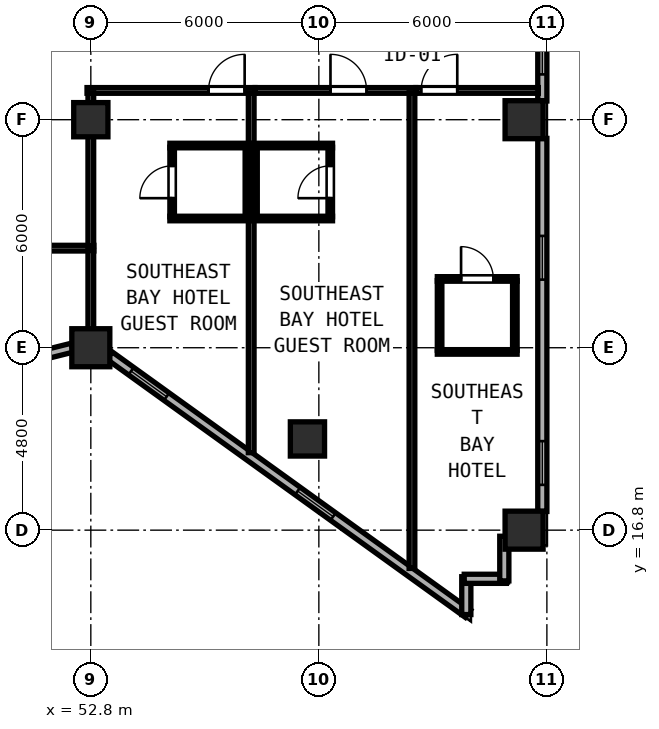
"""IFC4 building model, lengths in metres.
Left out: names, types, materials, properties, quantities, classifications, styles, units other than length and angle.
Written with IfcOpenShell. Run it as: python <this file> out.ifc"""

import sys

from ifc_helpers import new_model, si_unit, direction, frame, frame_2d, origin, origin_2d, place, context, subcontext, project, spatial, rectangle, hollow_rectangle, extrude, element, fill, save


model = new_model("IFC4")
c1 = context("Model", 3, precision=1e-05, world=origin(), true_north=direction((0.0, 1.0)))
c2 = subcontext(c1, "Body", "Model", "MODEL_VIEW")
j1 = project(units=[si_unit("LENGTHUNIT", "METRE"), si_unit("PLANEANGLEUNIT", "RADIAN")], contexts=[c1])
p1 = place(None, origin())
s1 = spatial("IfcSite", under=j1, at=p1, CompositionType="ELEMENT")
p2 = place(p1, origin())
s2 = spatial("IfcBuilding", under=s1, at=p2, CompositionType="ELEMENT")
p3 = place(p2, frame((0.0, 0.0, 128.8)))
s3 = spatial("IfcBuildingStorey", under=s2, at=p3, CompositionType="ELEMENT", Elevation=128.8)
for number, where, z_axis, x_axis in (
    (1, (52.8, 21.6, 0.0), (0.0, 0.0, 1.0), (1.0, 0.0, 0.0)),
    (2, (64.2, 16.8, 0.0), (0.0, 0.0, 1.0), (1.0, 0.0, 0.0)),
    (3, (64.2, 27.6, 0.0), (0.0, 0.0, 1.0), (1.0, 0.0, 0.0)),
):
    element("IfcColumn", number, at=place(p3, frame(where, z_axis=z_axis, x_axis=x_axis)), inside=s3, PredefinedType="COLUMN", context=c2, shape_type="SweptSolid", body=[
        extrude(hollow_rectangle(XDim=1.0, YDim=1.0, WallThickness=0.038, at=origin_2d()), origin(), (0.0, 0.0, 1.0), 3.8),
    ])
for number, where, z_axis, x_axis in (
    (4, (52.8, 27.6, 0.0), (0.0, 0.0, 1.0), (1.0, 0.0, 0.0)),
    (5, (58.5, 19.2, 0.0), (0.0, 0.0, 1.0), (1.0, 0.0, 0.0)),
):
    element("IfcColumn", number, at=place(p3, frame(where, z_axis=z_axis, x_axis=x_axis)), inside=s3, PredefinedType="COLUMN", context=c2, shape_type="SweptSolid", body=[
        extrude(hollow_rectangle(XDim=0.9, YDim=0.9, WallThickness=0.034, at=origin_2d()), origin(), (0.0, 0.0, 1.0), 3.8),
    ])
p4 = place(p3, frame((47.932, 20.507, 0.0), z_axis=(0.0, 0.0, 1.0), x_axis=(0.970145683738, 0.242522890311, 0.0)))
e6 = element("IfcWall", 6, at=p4, inside=s3, PredefinedType="SOLIDWALL", context=c2, shape_type="SweptSolid", body=[
    extrude(rectangle(XDim=4.511, YDim=0.24, at=frame_2d((2.255, 0.0))), origin(), (0.0, 0.0, 1.0), 3.145),
])
p5 = place(p4, frame((0.7, 0.0, 0.85)))
e7 = element("IfcOpeningElement", 7, at=p5, cuts=e6, PredefinedType="OPENING", context=c2, shape_type="SweptSolid", body=[
    extrude(rectangle(XDim=1.15, YDim=1.8, at=frame_2d((0.575, 0.9))), frame((0.0, 0.13, 0.0), z_axis=(0.0, -1.0, 0.0), x_axis=(1.0, 0.0, 0.0)), (0.0, 0.0, 1.0), 0.26),
])
p6 = place(p3, frame((53.292, 21.394, 0.0), z_axis=(0.0, 0.0, 1.0), x_axis=(0.811543504691, -0.584291998913, 0.0)))
e8 = element("IfcWall", 8, at=p6, inside=s3, PredefinedType="SOLIDWALL", context=c2, shape_type="SweptSolid", body=[
    extrude(rectangle(XDim=11.623, YDim=0.24, at=frame_2d((5.812, 0.0))), origin(), (0.0, 0.0, 1.0), 3.145),
])
p7 = place(p6, frame((0.7, 0.0, 0.85)))
e9 = element("IfcOpeningElement", 9, at=p7, cuts=e8, PredefinedType="OPENING", context=c2, shape_type="SweptSolid", body=[
    extrude(rectangle(XDim=1.15, YDim=1.8, at=frame_2d((0.575, 0.9))), frame((0.0, 0.13, 0.0), z_axis=(0.0, -1.0, 0.0), x_axis=(1.0, 0.0, 0.0)), (0.0, 0.0, 1.0), 0.26),
])
p8 = place(p6, frame((6.1, 0.0, 0.85)))
e10 = element("IfcOpeningElement", 10, at=p8, cuts=e8, PredefinedType="OPENING", context=c2, shape_type="SweptSolid", body=[
    extrude(rectangle(XDim=1.15, YDim=1.8, at=frame_2d((0.575, 0.9))), frame((0.0, 0.13, 0.0), z_axis=(0.0, -1.0, 0.0), x_axis=(1.0, 0.0, 0.0)), (0.0, 0.0, 1.0), 0.26),
])
p9 = place(p3, frame((62.68, 14.579, 0.0), z_axis=(0.0, 0.0, 1.0), x_axis=(0.0, 1.0, 0.0)))
e11 = element("IfcWall", 11, at=p9, inside=s3, PredefinedType="SOLIDWALL", context=c2, shape_type="SweptSolid", body=[
    extrude(rectangle(XDim=0.996, YDim=0.24, at=frame_2d((0.498, 0.0))), origin(), (0.0, 0.0, 1.0), 3.6),
])
p10 = place(p3, frame((62.625, 15.52, 0.0), z_axis=(0.0, 0.0, 1.0), x_axis=(1.0, 0.0, 0.0)))
e12 = element("IfcWall", 12, at=p10, inside=s3, PredefinedType="SOLIDWALL", context=c2, shape_type="SweptSolid", body=[
    extrude(rectangle(XDim=1.11, YDim=0.24, at=frame_2d((0.555, 0.0))), origin(), (0.0, 0.0, 1.0), 3.6),
])
p11 = place(p3, frame((63.68, 15.465, 0.0), z_axis=(0.0, 0.0, 1.0), x_axis=(0.0, 1.0, 0.0)))
e13 = element("IfcWall", 13, at=p11, inside=s3, PredefinedType="SOLIDWALL", context=c2, shape_type="SweptSolid", body=[
    extrude(rectangle(XDim=1.175, YDim=0.24, at=frame_2d((0.587, 0.0))), origin(), (0.0, 0.0, 1.0), 3.6),
])
p12 = place(p3, frame((64.68, 17.292, 0.0), z_axis=(0.0, 0.0, 1.0), x_axis=(0.0, 1.0, 0.0)))
e14 = element("IfcWall", 14, at=p12, inside=s3, PredefinedType="SOLIDWALL", context=c2, shape_type="SweptSolid", body=[
    extrude(rectangle(XDim=9.816, YDim=0.24, at=frame_2d((4.908, 0.0))), origin(), (0.0, 0.0, 1.0), 3.6),
])
p13 = place(p12, frame((0.7, 0.0, 0.85)))
e15 = element("IfcOpeningElement", 15, at=p13, cuts=e14, PredefinedType="OPENING", context=c2, shape_type="SweptSolid", body=[
    extrude(rectangle(XDim=1.15, YDim=1.8, at=frame_2d((0.575, 0.9))), frame((0.0, 0.13, 0.0), z_axis=(0.0, -1.0, 0.0), x_axis=(1.0, 0.0, 0.0)), (0.0, 0.0, 1.0), 0.26),
])
p14 = place(p12, frame((6.1, 0.0, 0.85)))
e16 = element("IfcOpeningElement", 16, at=p14, cuts=e14, PredefinedType="OPENING", context=c2, shape_type="SweptSolid", body=[
    extrude(rectangle(XDim=1.15, YDim=1.8, at=frame_2d((0.575, 0.9))), frame((0.0, 0.13, 0.0), z_axis=(0.0, -1.0, 0.0), x_axis=(1.0, 0.0, 0.0)), (0.0, 0.0, 1.0), 0.26),
])
p15 = place(p3, frame((64.68, 28.092, 0.0), z_axis=(0.0, 0.0, 1.0), x_axis=(0.0, 1.0, 0.0)))
e17 = element("IfcWall", 17, at=p15, inside=s3, PredefinedType="SOLIDWALL", context=c2, shape_type="SweptSolid", body=[
    extrude(rectangle(XDim=9.443, YDim=0.24, at=frame_2d((4.721, 0.0))), origin(), (0.0, 0.0, 1.0), 3.6),
])
p16 = place(p15, frame((0.7, 0.0, 0.85)))
e18 = element("IfcOpeningElement", 18, at=p16, cuts=e17, PredefinedType="OPENING", context=c2, shape_type="SweptSolid", body=[
    extrude(rectangle(XDim=1.15, YDim=1.8, at=frame_2d((0.575, 0.9))), frame((0.0, 0.13, 0.0), z_axis=(0.0, -1.0, 0.0), x_axis=(1.0, 0.0, 0.0)), (0.0, 0.0, 1.0), 0.26),
])
p17 = place(p15, frame((6.1, 0.0, 0.85)))
e19 = element("IfcOpeningElement", 19, at=p17, cuts=e17, PredefinedType="OPENING", context=c2, shape_type="SweptSolid", body=[
    extrude(rectangle(XDim=1.15, YDim=1.8, at=frame_2d((0.575, 0.9))), frame((0.0, 0.13, 0.0), z_axis=(0.0, -1.0, 0.0), x_axis=(1.0, 0.0, 0.0)), (0.0, 0.0, 1.0), 0.26),
])
p18 = place(p3, frame((45.682, 24.22, 0.0), z_axis=(0.0, 0.0, 1.0), x_axis=(1.0, 0.0, 0.0)))
e20 = element("IfcWall", 20, at=p18, inside=s3, PredefinedType="PARTITIONING", context=c2, shape_type="SweptSolid", body=[
    extrude(rectangle(XDim=7.198, YDim=0.15, at=frame_2d((3.599, 0.0))), origin(), (0.0, 0.0, 1.0), 3.6),
])
p19 = place(p18, frame((2.143, 0.0, 0.0), z_axis=(0.0, 0.0, 1.0), x_axis=(-1.0, 0.0, 0.0)))
e21 = element("IfcOpeningElement", 21, at=p19, cuts=e20, PredefinedType="OPENING", context=c2, shape_type="SweptSolid", body=[
    extrude(rectangle(XDim=0.95, YDim=2.12, at=frame_2d((0.475, 1.06))), frame((0.0, 0.085, 0.0), z_axis=(0.0, -1.0, 0.0), x_axis=(1.0, 0.0, 0.0)), (0.0, 0.0, 1.0), 0.17),
])
p20 = place(p3, frame((52.8, 21.819, 0.0), z_axis=(0.0, 0.0, 1.0), x_axis=(0.0, 1.0, 0.0)))
e22 = element("IfcWall", 22, at=p20, inside=s3, PredefinedType="PARTITIONING", context=c2, shape_type="SweptSolid", body=[
    extrude(rectangle(XDim=2.341, YDim=0.15, at=frame_2d((1.171, 0.0))), origin(), (0.0, 0.0, 1.0), 3.145),
])
p21 = place(p3, frame((52.7, 28.37, 0.0), z_axis=(0.0, 0.0, 1.0), x_axis=(1.0, 0.0, 0.0)))
e23 = element("IfcWall", 23, at=p21, inside=s3, PredefinedType="PARTITIONING", context=c2, shape_type="SweptSolid", body=[
    extrude(rectangle(XDim=4.42, YDim=0.15, at=frame_2d((2.21, 0.0))), origin(), (0.0, 0.0, 1.0), 3.6),
])
p22 = place(p21, frame((4.147, 0.0, 0.0), z_axis=(0.0, 0.0, 1.0), x_axis=(-1.0, 0.0, 0.0)))
e24 = element("IfcOpeningElement", 24, at=p22, cuts=e23, PredefinedType="OPENING", context=c2, shape_type="SweptSolid", body=[
    extrude(rectangle(XDim=0.95, YDim=2.15, at=frame_2d((0.475, 1.075))), frame((0.0, 0.085, 0.0), z_axis=(0.0, -1.0, 0.0), x_axis=(1.0, 0.0, 0.0)), (0.0, 0.0, 1.0), 0.17),
])
p23 = place(p3, frame((52.8, 24.28, 0.0), z_axis=(0.0, 0.0, 1.0), x_axis=(0.0, 1.0, 0.0)))
e25 = element("IfcWall", 25, at=p23, inside=s3, PredefinedType="PARTITIONING", context=c2, shape_type="SweptSolid", body=[
    extrude(rectangle(XDim=4.03, YDim=0.15, at=frame_2d((2.015, 0.0))), origin(), (0.0, 0.0, 1.0), 3.145),
])
p24 = place(p3, frame((57.02, 18.839, 0.0), z_axis=(0.0, 0.0, 1.0), x_axis=(0.0, 1.0, 0.0)))
e26 = element("IfcWall", 26, at=p24, inside=s3, PredefinedType="PARTITIONING", context=c2, shape_type="SweptSolid", body=[
    extrude(rectangle(XDim=9.471, YDim=0.15, at=frame_2d((4.736, 0.0))), origin(), (0.0, 0.0, 1.0), 3.6),
])
for number, where, z_axis, x_axis in (
    (27, (54.88, 26.92, 0.0), (0.0, 0.0, 1.0), (1.0, 0.0, 0.0)),
    (28, (54.88, 25.0, 0.0), (0.0, 0.0, 1.0), (1.0, 0.0, 0.0)),
):
    element("IfcWall", number, at=place(p3, frame(where, z_axis=z_axis, x_axis=x_axis)), inside=s3, PredefinedType="PARTITIONING", context=c2, shape_type="SweptSolid", body=[
        extrude(rectangle(XDim=2.08, YDim=0.12, at=frame_2d((1.04, 0.0))), origin(), (0.0, 0.0, 1.0), 3.6),
    ])
p25 = place(p3, frame((54.94, 25.045, 0.0), z_axis=(0.0, 0.0, 1.0), x_axis=(0.0, 1.0, 0.0)))
e29 = element("IfcWall", 29, at=p25, inside=s3, PredefinedType="PARTITIONING", context=c2, shape_type="SweptSolid", body=[
    extrude(rectangle(XDim=1.83, YDim=0.12, at=frame_2d((0.915, 0.0))), origin(), (0.0, 0.0, 1.0), 3.6),
])
p26 = place(p25, frame((1.34, 0.0, 0.0), z_axis=(0.0, 0.0, 1.0), x_axis=(-1.0, 0.0, 0.0)))
e30 = element("IfcOpeningElement", 30, at=p26, cuts=e29, PredefinedType="OPENING", context=c2, shape_type="SweptSolid", body=[
    extrude(rectangle(XDim=0.85, YDim=2.1, at=frame_2d((0.425, 1.05))), frame((0.0, 0.07, 0.0), z_axis=(0.0, -1.0, 0.0), x_axis=(1.0, 0.0, 0.0)), (0.0, 0.0, 1.0), 0.14),
])
p27 = place(p3, frame((56.92, 25.045, 0.0), z_axis=(0.0, 0.0, 1.0), x_axis=(0.0, 1.0, 0.0)))
e31 = element("IfcWall", 31, at=p27, inside=s3, PredefinedType="PARTITIONING", context=c2, shape_type="SweptSolid", body=[
    extrude(rectangle(XDim=1.83, YDim=0.12, at=frame_2d((0.915, 0.0))), origin(), (0.0, 0.0, 1.0), 3.6),
])
p28 = place(p3, frame((57.122, 28.37, 0.0), z_axis=(0.0, 0.0, 1.0), x_axis=(1.0, 0.0, 0.0)))
e32 = element("IfcWall", 32, at=p28, inside=s3, PredefinedType="PARTITIONING", context=c2, shape_type="SweptSolid", body=[
    extrude(rectangle(XDim=4.228, YDim=0.15, at=frame_2d((2.114, 0.0))), origin(), (0.0, 0.0, 1.0), 3.6),
])
p29 = place(p28, frame((2.934, 0.0, 0.0), z_axis=(0.0, 0.0, 1.0), x_axis=(-1.0, 0.0, 0.0)))
e33 = element("IfcOpeningElement", 33, at=p29, cuts=e32, PredefinedType="OPENING", context=c2, shape_type="SweptSolid", body=[
    extrude(rectangle(XDim=0.95, YDim=2.15, at=frame_2d((0.475, 1.075))), frame((0.0, 0.085, 0.0), z_axis=(0.0, -1.0, 0.0), x_axis=(1.0, 0.0, 0.0)), (0.0, 0.0, 1.0), 0.17),
])
p30 = place(p3, frame((61.25, 15.793, 0.0), z_axis=(0.0, 0.0, 1.0), x_axis=(0.0, 1.0, 0.0)))
e34 = element("IfcWall", 34, at=p30, inside=s3, PredefinedType="PARTITIONING", context=c2, shape_type="SweptSolid", body=[
    extrude(rectangle(XDim=12.517, YDim=0.15, at=frame_2d((6.258, 0.0))), origin(), (0.0, 0.0, 1.0), 3.6),
])
for number, where, z_axis, x_axis in (
    (35, (57.08, 26.92, 0.0), (0.0, 0.0, 1.0), (1.0, 0.0, 0.0)),
    (36, (57.08, 25.0, 0.0), (0.0, 0.0, 1.0), (1.0, 0.0, 0.0)),
):
    element("IfcWall", number, at=place(p3, frame(where, z_axis=z_axis, x_axis=x_axis)), inside=s3, PredefinedType="PARTITIONING", context=c2, shape_type="SweptSolid", body=[
        extrude(rectangle(XDim=2.08, YDim=0.12, at=frame_2d((1.04, 0.0))), origin(), (0.0, 0.0, 1.0), 3.6),
    ])
p31 = place(p3, frame((57.12, 25.045, 0.0), z_axis=(0.0, 0.0, 1.0), x_axis=(0.0, 1.0, 0.0)))
e37 = element("IfcWall", 37, at=p31, inside=s3, PredefinedType="PARTITIONING", context=c2, shape_type="SweptSolid", body=[
    extrude(rectangle(XDim=1.83, YDim=0.12, at=frame_2d((0.915, 0.0))), origin(), (0.0, 0.0, 1.0), 3.6),
])
p32 = place(p3, frame((59.1, 25.045, 0.0), z_axis=(0.0, 0.0, 1.0), x_axis=(0.0, 1.0, 0.0)))
e38 = element("IfcWall", 38, at=p32, inside=s3, PredefinedType="PARTITIONING", context=c2, shape_type="SweptSolid", body=[
    extrude(rectangle(XDim=1.83, YDim=0.12, at=frame_2d((0.915, 0.0))), origin(), (0.0, 0.0, 1.0), 3.6),
])
p33 = place(p32, frame((0.49, 0.0, 0.0)))
e39 = element("IfcOpeningElement", 39, at=p33, cuts=e38, PredefinedType="OPENING", context=c2, shape_type="SweptSolid", body=[
    extrude(rectangle(XDim=0.85, YDim=2.1, at=frame_2d((0.425, 1.05))), frame((0.0, 0.07, 0.0), z_axis=(0.0, -1.0, 0.0), x_axis=(1.0, 0.0, 0.0)), (0.0, 0.0, 1.0), 0.14),
])
p34 = place(p3, frame((61.352, 28.37, 0.0), z_axis=(0.0, 0.0, 1.0), x_axis=(1.0, 0.0, 0.0)))
e40 = element("IfcWall", 40, at=p34, inside=s3, PredefinedType="PARTITIONING", context=c2, shape_type="SweptSolid", body=[
    extrude(rectangle(XDim=3.223, YDim=0.15, at=frame_2d((1.611, 0.0))), origin(), (0.0, 0.0, 1.0), 3.6),
])
p35 = place(p34, frame((1.09, 0.0, 0.0), z_axis=(0.0, 0.0, 1.0), x_axis=(-1.0, 0.0, 0.0)))
e41 = element("IfcOpeningElement", 41, at=p35, cuts=e40, PredefinedType="OPENING", context=c2, shape_type="SweptSolid", body=[
    extrude(rectangle(XDim=0.95, YDim=2.15, at=frame_2d((0.475, 1.075))), frame((0.0, 0.085, 0.0), z_axis=(0.0, -1.0, 0.0), x_axis=(1.0, 0.0, 0.0)), (0.0, 0.0, 1.0), 0.17),
])
p36 = place(p3, frame((61.917, 23.41, 0.0), z_axis=(0.0, 0.0, 1.0), x_axis=(1.0, 0.0, 0.0)))
e42 = element("IfcWall", 42, at=p36, inside=s3, PredefinedType="PARTITIONING", context=c2, shape_type="SweptSolid", body=[
    extrude(rectangle(XDim=2.1, YDim=0.12, at=frame_2d((1.05, 0.0))), origin(), (0.0, 0.0, 1.0), 3.6),
])
p37 = place(p36, frame((1.475, 0.0, 0.0), z_axis=(0.0, 0.0, 1.0), x_axis=(-1.0, 0.0, 0.0)))
e43 = element("IfcOpeningElement", 43, at=p37, cuts=e42, PredefinedType="OPENING", context=c2, shape_type="SweptSolid", body=[
    extrude(rectangle(XDim=0.85, YDim=2.1, at=frame_2d((0.425, 1.05))), frame((0.0, 0.07, 0.0), z_axis=(0.0, -1.0, 0.0), x_axis=(1.0, 0.0, 0.0)), (0.0, 0.0, 1.0), 0.14),
])
p38 = place(p3, frame((61.917, 21.49, 0.0), z_axis=(0.0, 0.0, 1.0), x_axis=(1.0, 0.0, 0.0)))
e44 = element("IfcWall", 44, at=p38, inside=s3, PredefinedType="PARTITIONING", context=c2, shape_type="SweptSolid", body=[
    extrude(rectangle(XDim=2.1, YDim=0.12, at=frame_2d((1.05, 0.0))), origin(), (0.0, 0.0, 1.0), 3.6),
])
for number, where, z_axis, x_axis in (
    (45, (61.977, 21.535, 0.0), (0.0, 0.0, 1.0), (0.0, 1.0, 0.0)),
    (46, (63.957, 21.535, 0.0), (0.0, 0.0, 1.0), (0.0, 1.0, 0.0)),
):
    element("IfcWall", number, at=place(p3, frame(where, z_axis=z_axis, x_axis=x_axis)), inside=s3, PredefinedType="PARTITIONING", context=c2, shape_type="SweptSolid", body=[
        extrude(rectangle(XDim=1.83, YDim=0.12, at=frame_2d((0.915, 0.0))), origin(), (0.0, 0.0, 1.0), 3.6),
    ])
p39 = place(p7, origin())
e47 = element("IfcWindow", 47, at=p39, inside=s3, PartitioningType="SINGLE_PANEL", PredefinedType="WINDOW", context=c2, shape_type="SweptSolid", body=[
    extrude(rectangle(XDim=1.15, YDim=1.8, at=frame_2d((0.575, 0.9))), frame((0.0, 0.03, 0.0), z_axis=(0.0, -1.0, 0.0), x_axis=(1.0, 0.0, 0.0)), (0.0, 0.0, 1.0), 0.06),
])
fill(e9, e47)
p40 = place(p8, origin())
e48 = element("IfcWindow", 48, at=p40, inside=s3, PartitioningType="SINGLE_PANEL", PredefinedType="WINDOW", context=c2, shape_type="SweptSolid", body=[
    extrude(rectangle(XDim=1.15, YDim=1.8, at=frame_2d((0.575, 0.9))), frame((0.0, 0.03, 0.0), z_axis=(0.0, -1.0, 0.0), x_axis=(1.0, 0.0, 0.0)), (0.0, 0.0, 1.0), 0.06),
])
fill(e10, e48)
p41 = place(p13, origin())
e49 = element("IfcWindow", 49, at=p41, inside=s3, PartitioningType="SINGLE_PANEL", PredefinedType="WINDOW", context=c2, shape_type="SweptSolid", body=[
    extrude(rectangle(XDim=1.15, YDim=1.8, at=frame_2d((0.575, 0.9))), frame((0.0, 0.03, 0.0), z_axis=(0.0, -1.0, 0.0), x_axis=(1.0, 0.0, 0.0)), (0.0, 0.0, 1.0), 0.06),
])
fill(e15, e49)
p42 = place(p14, origin())
e50 = element("IfcWindow", 50, at=p42, inside=s3, PartitioningType="SINGLE_PANEL", PredefinedType="WINDOW", context=c2, shape_type="SweptSolid", body=[
    extrude(rectangle(XDim=1.15, YDim=1.8, at=frame_2d((0.575, 0.9))), frame((0.0, 0.03, 0.0), z_axis=(0.0, -1.0, 0.0), x_axis=(1.0, 0.0, 0.0)), (0.0, 0.0, 1.0), 0.06),
])
fill(e16, e50)
p43 = place(p16, origin())
e51 = element("IfcWindow", 51, at=p43, inside=s3, PartitioningType="SINGLE_PANEL", PredefinedType="WINDOW", context=c2, shape_type="SweptSolid", body=[
    extrude(rectangle(XDim=1.15, YDim=1.8, at=frame_2d((0.575, 0.9))), frame((0.0, 0.03, 0.0), z_axis=(0.0, -1.0, 0.0), x_axis=(1.0, 0.0, 0.0)), (0.0, 0.0, 1.0), 0.06),
])
fill(e18, e51)
p44 = place(p22, origin())
e52 = element("IfcDoor", 52, at=p44, inside=s3, OperationType="SINGLE_SWING_LEFT", PredefinedType="DOOR", context=c2, shape_type="SweptSolid", body=[
    extrude(rectangle(XDim=0.95, YDim=2.15, at=frame_2d((0.475, 1.075))), frame((0.0, 0.025, 0.0), z_axis=(0.0, -1.0, 0.0), x_axis=(1.0, 0.0, 0.0)), (0.0, 0.0, 1.0), 0.05),
])
fill(e24, e52)
p45 = place(p26, origin())
e53 = element("IfcDoor", 53, at=p45, inside=s3, OperationType="SINGLE_SWING_RIGHT", PredefinedType="DOOR", context=c2, shape_type="SweptSolid", body=[
    extrude(rectangle(XDim=0.85, YDim=2.1, at=frame_2d((0.425, 1.05))), frame((0.0, 0.025, 0.0), z_axis=(0.0, -1.0, 0.0), x_axis=(1.0, 0.0, 0.0)), (0.0, 0.0, 1.0), 0.05),
])
fill(e30, e53)
p46 = place(p29, origin())
e54 = element("IfcDoor", 54, at=p46, inside=s3, OperationType="SINGLE_SWING_RIGHT", PredefinedType="DOOR", context=c2, shape_type="SweptSolid", body=[
    extrude(rectangle(XDim=0.95, YDim=2.15, at=frame_2d((0.475, 1.075))), frame((0.0, 0.025, 0.0), z_axis=(0.0, -1.0, 0.0), x_axis=(1.0, 0.0, 0.0)), (0.0, 0.0, 1.0), 0.05),
])
fill(e33, e54)
p47 = place(p33, origin())
e55 = element("IfcDoor", 55, at=p47, inside=s3, OperationType="SINGLE_SWING_LEFT", PredefinedType="DOOR", context=c2, shape_type="SweptSolid", body=[
    extrude(rectangle(XDim=0.85, YDim=2.1, at=frame_2d((0.425, 1.05))), frame((0.0, 0.025, 0.0), z_axis=(0.0, -1.0, 0.0), x_axis=(1.0, 0.0, 0.0)), (0.0, 0.0, 1.0), 0.05),
])
fill(e39, e55)
p48 = place(p35, origin())
e56 = element("IfcDoor", 56, at=p48, inside=s3, OperationType="SINGLE_SWING_LEFT", PredefinedType="DOOR", context=c2, shape_type="SweptSolid", body=[
    extrude(rectangle(XDim=0.95, YDim=2.15, at=frame_2d((0.475, 1.075))), frame((0.0, 0.025, 0.0), z_axis=(0.0, -1.0, 0.0), x_axis=(1.0, 0.0, 0.0)), (0.0, 0.0, 1.0), 0.05),
])
fill(e41, e56)
p49 = place(p37, origin())
e57 = element("IfcDoor", 57, at=p49, inside=s3, OperationType="SINGLE_SWING_RIGHT", PredefinedType="DOOR", context=c2, shape_type="SweptSolid", body=[
    extrude(rectangle(XDim=0.85, YDim=2.1, at=frame_2d((0.425, 1.05))), frame((0.0, 0.025, 0.0), z_axis=(0.0, -1.0, 0.0), x_axis=(1.0, 0.0, 0.0)), (0.0, 0.0, 1.0), 0.05),
])
fill(e43, e57)
save(model, sys.argv[1])
